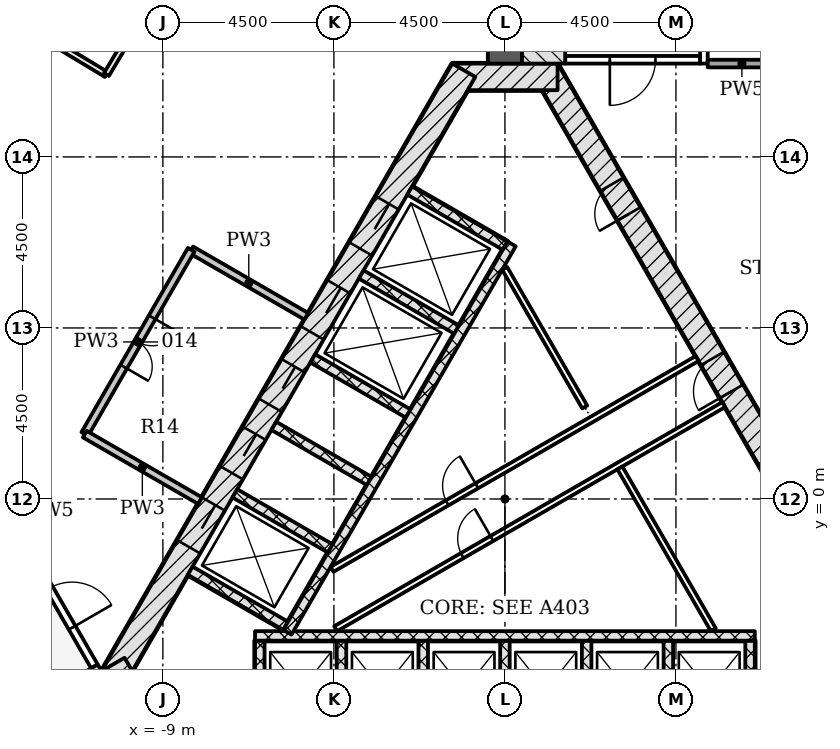
"""IFC4 building model, lengths in metres.
Left out: names, types, materials, properties, quantities, classifications, styles, units other than length and angle.
Written with IfcOpenShell. Run it as: python <this file> out.ifc"""

import sys

from ifc_helpers import new_model, si_unit, direction, frame, frame_2d, origin, place, context, subcontext, project, spatial, rectangle, extrude, element, fill, save


model = new_model("IFC4")
c1 = context("Model", 3, precision=1e-05, world=origin(), true_north=direction((0.0, 1.0)))
c2 = subcontext(c1, "Body", "Model", "MODEL_VIEW")
j1 = project(units=[si_unit("LENGTHUNIT", "METRE"), si_unit("PLANEANGLEUNIT", "RADIAN")], contexts=[c1])
p1 = place(None, origin())
s1 = spatial("IfcSite", under=j1, at=p1, CompositionType="ELEMENT")
p2 = place(p1, origin())
s2 = spatial("IfcBuilding", under=s1, at=p2, CompositionType="ELEMENT")
p3 = place(p2, origin())
s3 = spatial("IfcBuildingStorey", under=s2, at=p3, CompositionType="ELEMENT", Elevation=0.0)
p4 = place(p3, frame((10.311, -4.703, -0.25), z_axis=(0.0, 0.0, 1.0), x_axis=(-0.500001446645, 0.866024568562, 0.0)))
e1 = element("IfcWall", 1, at=p4, inside=s3, PredefinedType="SHEAR", context=c2, shape_type="SweptSolid", body=[
    extrude(rectangle(XDim=18.458, YDim=0.7, at=frame_2d((9.229, 0.0))), origin(), (0.0, 0.0, 1.0), 6.0),
])
p5 = place(p4, frame((8.7, 0.0, 0.25)))
e2 = element("IfcOpeningElement", 2, at=p5, cuts=e1, PredefinedType="OPENING", context=c2, shape_type="SweptSolid", body=[
    extrude(rectangle(XDim=1.0, YDim=2.1, at=frame_2d((0.5, 1.05))), frame((0.0, 0.36, 0.0), z_axis=(0.0, -1.0, 0.0), x_axis=(1.0, 0.0, 0.0)), (0.0, 0.0, 1.0), 0.72),
])
p6 = place(p4, frame((4.002, 0.0, 0.25)))
e3 = element("IfcOpeningElement", 3, at=p6, cuts=e1, PredefinedType="OPENING", context=c2, shape_type="SweptSolid", body=[
    extrude(rectangle(XDim=0.9, YDim=2.1, at=frame_2d((0.45, 1.05))), frame((0.0, 0.36, 0.0), z_axis=(0.0, -1.0, 0.0), x_axis=(1.0, 0.0, 0.0)), (0.0, 0.0, 1.0), 0.72),
])
p7 = place(p4, frame((14.093, 0.0, 0.25)))
e4 = element("IfcOpeningElement", 4, at=p7, cuts=e1, PredefinedType="OPENING", context=c2, shape_type="SweptSolid", body=[
    extrude(rectangle(XDim=0.9, YDim=2.1, at=frame_2d((0.45, 1.05))), frame((0.0, 0.36, 0.0), z_axis=(0.0, -1.0, 0.0), x_axis=(1.0, 0.0, 0.0)), (0.0, 0.0, 1.0), 0.72),
])
p8 = place(p3, frame((1.386, 11.106, -0.25), z_axis=(0.0, 0.0, 1.0), x_axis=(-1.0, 0.0, 0.0)))
e5 = element("IfcWall", 5, at=p8, inside=s3, PredefinedType="SHEAR", context=c2, shape_type="SweptSolid", body=[
    extrude(rectangle(XDim=2.771, YDim=0.7, at=frame_2d((1.386, 0.0))), origin(), (0.0, 0.0, 1.0), 6.0),
])
p9 = place(p3, frame((-1.083, 11.281, -0.25), z_axis=(0.0, 0.0, 1.0), x_axis=(-0.500001446645, -0.866024568562, 0.0)))
e6 = element("IfcWall", 6, at=p9, inside=s3, PredefinedType="SHEAR", context=c2, shape_type="SweptSolid", body=[
    extrude(rectangle(XDim=18.458, YDim=0.7, at=frame_2d((9.229, 0.0))), origin(), (0.0, 0.0, 1.0), 6.0),
])
p10 = place(p9, frame((4.029, 0.0, 0.25)))
e7 = element("IfcOpeningElement", 7, at=p10, cuts=e6, PredefinedType="OPENING", context=c2, shape_type="SweptSolid", body=[
    extrude(rectangle(XDim=1.4, YDim=2.1, at=frame_2d((0.7, 1.05))), frame((0.0, 0.36, 0.0), z_axis=(0.0, -1.0, 0.0), x_axis=(1.0, 0.0, 0.0)), (0.0, 0.0, 1.0), 0.72),
])
p11 = place(p9, frame((6.579, 0.0, 0.25)))
e8 = element("IfcOpeningElement", 8, at=p11, cuts=e6, PredefinedType="OPENING", context=c2, shape_type="SweptSolid", body=[
    extrude(rectangle(XDim=1.4, YDim=2.1, at=frame_2d((0.7, 1.05))), frame((0.0, 0.36, 0.0), z_axis=(0.0, -1.0, 0.0), x_axis=(1.0, 0.0, 0.0)), (0.0, 0.0, 1.0), 0.72),
])
p12 = place(p9, frame((8.979, 0.0, 0.25)))
e9 = element("IfcOpeningElement", 9, at=p12, cuts=e6, PredefinedType="OPENING", context=c2, shape_type="SweptSolid", body=[
    extrude(rectangle(XDim=1.2, YDim=2.1, at=frame_2d((0.6, 1.05))), frame((0.0, 0.36, 0.0), z_axis=(0.0, -1.0, 0.0), x_axis=(1.0, 0.0, 0.0)), (0.0, 0.0, 1.0), 0.72),
])
p13 = place(p9, frame((11.029, 0.0, 0.25)))
e10 = element("IfcOpeningElement", 10, at=p13, cuts=e6, PredefinedType="OPENING", context=c2, shape_type="SweptSolid", body=[
    extrude(rectangle(XDim=1.2, YDim=2.1, at=frame_2d((0.6, 1.05))), frame((0.0, 0.36, 0.0), z_axis=(0.0, -1.0, 0.0), x_axis=(1.0, 0.0, 0.0)), (0.0, 0.0, 1.0), 0.72),
])
p14 = place(p9, frame((13.179, 0.0, 0.25)))
e11 = element("IfcOpeningElement", 11, at=p14, cuts=e6, PredefinedType="OPENING", context=c2, shape_type="SweptSolid", body=[
    extrude(rectangle(XDim=1.3, YDim=2.1, at=frame_2d((0.65, 1.05))), frame((0.0, 0.36, 0.0), z_axis=(0.0, -1.0, 0.0), x_axis=(1.0, 0.0, 0.0)), (0.0, 0.0, 1.0), 0.72),
])
p15 = place(p3, frame((-10.311, -4.353, -0.25), z_axis=(0.0, 0.0, 1.0), x_axis=(0.500042739161, -0.866000726912, 0.0)))
e12 = element("IfcWall", 12, at=p15, inside=s3, PredefinedType="SHEAR", context=c2, shape_type="SweptSolid", body=[
    extrude(rectangle(XDim=2.771, YDim=0.7, at=frame_2d((1.386, 0.0))), origin(), (0.0, 0.0, 1.0), 6.0),
])
p16 = place(p3, frame((0.0, 11.456, -0.25), z_axis=(0.0, 0.0, 1.0), x_axis=(0.0, 1.0, 0.0)))
e13 = element("IfcWall", 13, at=p16, inside=s3, PredefinedType="SHEAR", context=c2, shape_type="SweptSolid", body=[
    extrude(rectangle(XDim=14.633, YDim=0.9, at=frame_2d((7.316, 0.0))), origin(), (0.0, 0.0, 1.0), 6.0),
])
for number, where, z_axis, x_axis in (
    (14, (-6.45, -6.228, -0.25), (0.0, 0.0, 1.0), (0.0, 1.0, 0.0)),
    (15, (-4.3, -6.228, -0.25), (0.0, 0.0, 1.0), (0.0, 1.0, 0.0)),
    (16, (-2.15, -6.228, -0.25), (0.0, 0.0, 1.0), (0.0, 1.0, 0.0)),
    (17, (0.0, -6.228, -0.25), (0.0, 0.0, 1.0), (0.0, 1.0, 0.0)),
    (18, (2.15, -6.228, -0.25), (0.0, 0.0, 1.0), (0.0, 1.0, 0.0)),
    (19, (4.3, -6.228, -0.25), (0.0, 0.0, 1.0), (0.0, 1.0, 0.0)),
    (20, (6.45, -6.228, -0.25), (0.0, 0.0, 1.0), (0.0, 1.0, 0.0)),
):
    element("IfcWall", number, at=place(p3, frame(where, z_axis=z_axis, x_axis=x_axis)), inside=s3, PredefinedType="PARTITIONING", context=c2, shape_type="SweptSolid", body=[
        extrude(rectangle(XDim=2.5, YDim=0.25, at=frame_2d((1.25, 0.0))), origin(), (0.0, 0.0, 1.0), 6.0),
    ])
p17 = place(p3, frame((-6.575, -3.603, 0.0), z_axis=(0.0, 0.0, 1.0), x_axis=(1.0, 0.0, 0.0)))
e21 = element("IfcWall", 21, at=p17, inside=s3, PredefinedType="PARTITIONING", context=c2, shape_type="SweptSolid", body=[
    extrude(rectangle(XDim=13.15, YDim=0.25, at=frame_2d((6.575, 0.0))), origin(), (0.0, 0.0, 1.0), 5.75),
])
p18 = place(p3, frame((-2.506, 8.115, -0.25), z_axis=(0.0, 0.0, 1.0), x_axis=(0.865996321171, -0.50005036918, 0.0)))
e22 = element("IfcWall", 22, at=p18, inside=s3, PredefinedType="PARTITIONING", context=c2, shape_type="SweptSolid", body=[
    extrude(rectangle(XDim=2.9, YDim=0.25, at=frame_2d((1.45, 0.0))), origin(), (0.0, 0.0, 1.0), 6.0),
])
for number, where, z_axis, x_axis in (
    (23, (-3.781, 5.907, -0.25), (0.0, 0.0, 1.0), (0.866, -0.5, 0.0)),
    (24, (-5.056, 3.699, -0.25), (0.0, 0.0, 1.0), (0.866, -0.5, 0.0)),
    (25, (-6.081, 1.923, -0.25), (0.0, 0.0, 1.0), (0.866, -0.5, 0.0)),
    (26, (-7.106, 0.148, -0.25), (0.0, 0.0, 1.0), (0.866, -0.5, 0.0)),
    (27, (-8.281, -1.887, -0.25), (0.0, 0.0, 1.0), (0.866, -0.5, 0.0)),
):
    element("IfcWall", number, at=place(p3, frame(where, z_axis=z_axis, x_axis=x_axis)), inside=s3, PredefinedType="PARTITIONING", context=c2, shape_type="SweptSolid", body=[
        extrude(rectangle(XDim=2.9, YDim=0.25, at=frame_2d((1.45, 0.0))), origin(), (0.0, 0.0, 1.0), 6.0),
    ])
p19 = place(p3, frame((0.176, 6.711, 0.0), z_axis=(0.0, 0.0, 1.0), x_axis=(-0.500004227369, -0.866022963098, 0.0)))
e28 = element("IfcWall", 28, at=p19, inside=s3, PredefinedType="PARTITIONING", context=c2, shape_type="SweptSolid", body=[
    extrude(rectangle(XDim=11.8, YDim=0.25, at=frame_2d((5.9, 0.0))), origin(), (0.0, 0.0, 1.0), 5.75),
])
p20 = place(p3, frame((-4.548, -1.851, 0.0), z_axis=(0.0, 0.0, 1.0), x_axis=(0.866023939251, 0.500002536638, 0.0)))
e29 = element("IfcWall", 29, at=p20, inside=s3, PredefinedType="PARTITIONING", context=c2, shape_type="SweptSolid", body=[
    extrude(rectangle(XDim=11.092, YDim=0.15, at=frame_2d((5.546, 0.0))), origin(), (0.0, 0.0, 1.0), 5.75),
])
p21 = place(p20, frame((3.497, 0.0, 0.0)))
e30 = element("IfcOpeningElement", 30, at=p21, cuts=e29, PredefinedType="OPENING", context=c2, shape_type="SweptSolid", body=[
    extrude(rectangle(XDim=0.9, YDim=2.1, at=frame_2d((0.45, 1.05))), frame((0.0, 0.085, 0.0), z_axis=(0.0, -1.0, 0.0), x_axis=(1.0, 0.0, 0.0)), (0.0, 0.0, 1.0), 0.17),
])
p22 = place(p3, frame((2.099, 2.42, 0.0), z_axis=(0.0, 0.0, 1.0), x_axis=(-0.499998449073, 0.866026299211, 0.0)))
e31 = element("IfcWall", 31, at=p22, inside=s3, PredefinedType="PARTITIONING", context=c2, shape_type="SweptSolid", body=[
    extrude(rectangle(XDim=4.211, YDim=0.15, at=frame_2d((2.106, 0.0))), origin(), (0.0, 0.0, 1.0), 5.75),
])
p23 = place(p3, frame((-4.454, -3.413, 0.0), z_axis=(0.0, 0.0, 1.0), x_axis=(0.86603043987, 0.499991277142, 0.0)))
e32 = element("IfcWall", 32, at=p23, inside=s3, PredefinedType="PARTITIONING", context=c2, shape_type="SweptSolid", body=[
    extrude(rectangle(XDim=11.792, YDim=0.15, at=frame_2d((5.896, 0.0))), origin(), (0.0, 0.0, 1.0), 5.75),
])
p24 = place(p23, frame((3.847, 0.0, 0.0)))
e33 = element("IfcOpeningElement", 33, at=p24, cuts=e32, PredefinedType="OPENING", context=c2, shape_type="SweptSolid", body=[
    extrude(rectangle(XDim=0.9, YDim=2.1, at=frame_2d((0.45, 1.05))), frame((0.0, 0.085, 0.0), z_axis=(0.0, -1.0, 0.0), x_axis=(1.0, 0.0, 0.0)), (0.0, 0.0, 1.0), 0.17),
])
p25 = place(p3, frame((5.482, -3.439, 0.0), z_axis=(0.0, 0.0, 1.0), x_axis=(-0.500006183238, 0.866021833861, 0.0)))
e34 = element("IfcWall", 34, at=p25, inside=s3, PredefinedType="PARTITIONING", context=c2, shape_type="SweptSolid", body=[
    extrude(rectangle(XDim=4.916, YDim=0.15, at=frame_2d((2.458, 0.0))), origin(), (0.0, 0.0, 1.0), 5.75),
])
p26 = place(p3, frame((5.135, 11.556, -0.25), z_axis=(0.0, 0.0, 1.0), x_axis=(-1.0, 0.0, 0.0)))
e35 = element("IfcWall", 35, at=p26, inside=s3, PredefinedType="SHEAR", context=c2, shape_type="SweptSolid", body=[
    extrude(rectangle(XDim=3.55, YDim=0.2, at=frame_2d((1.775, 0.0))), origin(), (0.0, 0.0, 1.0), 6.0),
])
p27 = place(p26, frame((1.175, 0.0, 0.25)))
e36 = element("IfcOpeningElement", 36, at=p27, cuts=e35, PredefinedType="OPENING", context=c2, shape_type="SweptSolid", body=[
    extrude(rectangle(XDim=1.2, YDim=2.1, at=frame_2d((0.6, 1.05))), frame((0.0, 0.11, 0.0), z_axis=(0.0, -1.0, 0.0), x_axis=(1.0, 0.0, 0.0)), (0.0, 0.0, 1.0), 0.22),
])
p28 = place(p3, frame((5.236, 11.456, -0.25), z_axis=(0.0, 0.0, 1.0), x_axis=(0.0, 1.0, 0.0)))
e37 = element("IfcWall", 37, at=p28, inside=s3, PredefinedType="SHEAR", context=c2, shape_type="SweptSolid", body=[
    extrude(rectangle(XDim=5.6, YDim=0.2, at=frame_2d((2.8, 0.0))), origin(), (0.0, 0.0, 1.0), 6.0),
])
p29 = place(p28, frame((0.45, 0.0, 0.25)))
e38 = element("IfcOpeningElement", 38, at=p29, cuts=e37, PredefinedType="OPENING", context=c2, shape_type="SweptSolid", body=[
    extrude(rectangle(XDim=1.2, YDim=2.1, at=frame_2d((0.6, 1.05))), frame((0.0, 0.11, 0.0), z_axis=(0.0, -1.0, 0.0), x_axis=(1.0, 0.0, 0.0)), (0.0, 0.0, 1.0), 0.22),
])
p30 = place(p3, frame((1.018, 11.456, -0.25), z_axis=(0.0, 0.0, 1.0), x_axis=(0.0, 1.0, 0.0)))
e39 = element("IfcWall", 39, at=p30, inside=s3, PredefinedType="SHEAR", context=c2, shape_type="SweptSolid", body=[
    extrude(rectangle(XDim=7.2, YDim=1.136, at=frame_2d((3.6, 0.0))), origin(), (0.0, 0.0, 1.0), 6.0),
])
p31 = place(p3, frame((-12.576, -1.331, -0.25), z_axis=(0.0, 0.0, 1.0), x_axis=(0.499970499736, -0.8660424351, 0.0)))
e40 = element("IfcWall", 40, at=p31, inside=s3, PredefinedType="SHEAR", context=c2, shape_type="SweptSolid", body=[
    extrude(rectangle(XDim=3.55, YDim=0.2, at=frame_2d((1.775, 0.0))), origin(), (0.0, 0.0, 1.0), 6.0),
])
p32 = place(p31, frame((1.175, 0.0, 0.25)))
e41 = element("IfcOpeningElement", 41, at=p32, cuts=e40, PredefinedType="OPENING", context=c2, shape_type="SweptSolid", body=[
    extrude(rectangle(XDim=1.2, YDim=2.1, at=frame_2d((0.6, 1.05))), frame((0.0, 0.11, 0.0), z_axis=(0.0, -1.0, 0.0), x_axis=(1.0, 0.0, 0.0)), (0.0, 0.0, 1.0), 0.22),
])
p33 = place(p3, frame((-10.43, -4.847, -0.25), z_axis=(0.0, 0.0, 1.0), x_axis=(-0.866018442252, -0.500012057535, 0.0)))
e42 = element("IfcWall", 42, at=p33, inside=s3, PredefinedType="SHEAR", context=c2, shape_type="SweptSolid", body=[
    extrude(rectangle(XDim=7.2, YDim=1.136, at=frame_2d((3.6, 0.0))), origin(), (0.0, 0.0, 1.0), 6.0),
])
p34 = place(p3, frame((7.136, 11.456, 0.0), z_axis=(0.0, 0.0, 1.0), x_axis=(-1.0, 0.0, 0.0)))
e43 = element("IfcWall", 43, at=p34, inside=s3, PredefinedType="PARTITIONING", context=c2, shape_type="SweptSolid", body=[
    extrude(rectangle(XDim=1.8, YDim=0.2, at=frame_2d((0.9, 0.0))), origin(), (0.0, 0.0, 1.0), 5.75),
])
p35 = place(p3, frame((-5.225, 4.806, 0.0), z_axis=(0.0, 0.0, 1.0), x_axis=(-0.865932233204, 0.500161341467, 0.0)))
e44 = element("IfcWall", 44, at=p35, inside=s3, PredefinedType="PARTITIONING", context=c2, shape_type="SweptSolid", body=[
    extrude(rectangle(XDim=3.499, YDim=0.2, at=frame_2d((1.75, 0.0))), origin(), (0.0, 0.0, 1.0), 5.75),
])
p36 = place(p3, frame((-8.256, 6.556, 0.0), z_axis=(0.0, 0.0, 1.0), x_axis=(-0.500040756506, -0.866001871726, 0.0)))
e45 = element("IfcWall", 45, at=p36, inside=s3, PredefinedType="PARTITIONING", context=c2, shape_type="SweptSolid", body=[
    extrude(rectangle(XDim=5.599, YDim=0.2, at=frame_2d((2.8, 0.0))), origin(), (0.0, 0.0, 1.0), 5.138),
])
p37 = place(p36, frame((2.05, 0.0, 0.0)))
e46 = element("IfcOpeningElement", 46, at=p37, cuts=e45, PredefinedType="OPENING", context=c2, shape_type="SweptSolid", body=[
    extrude(rectangle(XDim=1.5, YDim=2.1, at=frame_2d((0.75, 1.05))), frame((0.0, 0.11, 0.0), z_axis=(0.0, -1.0, 0.0), x_axis=(1.0, 0.0, 0.0)), (0.0, 0.0, 1.0), 0.22),
])
p38 = place(p3, frame((-11.056, 1.707, 0.0), z_axis=(0.0, 0.0, 1.0), x_axis=(0.866019471182, -0.500010275428, 0.0)))
e47 = element("IfcWall", 47, at=p38, inside=s3, PredefinedType="PARTITIONING", context=c2, shape_type="SweptSolid", body=[
    extrude(rectangle(XDim=3.5, YDim=0.2, at=frame_2d((1.75, 0.0))), origin(), (0.0, 0.0, 1.0), 5.75),
])
p39 = place(p3, frame((-12.735, 12.524, 0.0), z_axis=(0.0, 0.0, 1.0), x_axis=(0.856490884452, -0.516162149766, 0.0)))
e48 = element("IfcWall", 48, at=p39, inside=s3, PredefinedType="PARTITIONING", context=c2, shape_type="SweptSolid", body=[
    extrude(rectangle(XDim=2.627, YDim=0.15, at=frame_2d((1.313, 0.0))), origin(), (0.0, 0.0, 1.0), 5.138),
])
p40 = place(p3, frame((-10.485, 11.169, 0.0), z_axis=(0.0, 0.0, 1.0), x_axis=(0.513360176277, 0.858173251397, 0.0)))
e49 = element("IfcWall", 49, at=p40, inside=s3, PredefinedType="PARTITIONING", context=c2, shape_type="SweptSolid", body=[
    extrude(rectangle(XDim=4.428, YDim=0.15, at=frame_2d((2.214, 0.0))), origin(), (0.0, 0.0, 1.0), 5.138),
])
p41 = place(p40, frame((1.75, 0.0, 0.0)))
e50 = element("IfcOpeningElement", 50, at=p41, cuts=e49, PredefinedType="OPENING", context=c2, shape_type="SweptSolid", body=[
    extrude(rectangle(XDim=1.0, YDim=2.1, at=frame_2d((0.5, 1.05))), frame((0.0, 0.085, 0.0), z_axis=(0.0, -1.0, 0.0), x_axis=(1.0, 0.0, 0.0)), (0.0, 0.0, 1.0), 0.17),
])
p42 = place(p10, origin())
e51 = element("IfcDoor", 51, at=p42, inside=s3, OperationType="DOUBLE_DOOR_SLIDING", PredefinedType="DOOR", context=c2, shape_type="SweptSolid", body=[
    extrude(rectangle(XDim=1.4, YDim=2.1, at=frame_2d((0.7, 1.05))), frame((0.0, 0.025, 0.0), z_axis=(0.0, -1.0, 0.0), x_axis=(1.0, 0.0, 0.0)), (0.0, 0.0, 1.0), 0.05),
])
fill(e7, e51)
p43 = place(p11, origin())
e52 = element("IfcDoor", 52, at=p43, inside=s3, OperationType="DOUBLE_DOOR_SLIDING", PredefinedType="DOOR", context=c2, shape_type="SweptSolid", body=[
    extrude(rectangle(XDim=1.4, YDim=2.1, at=frame_2d((0.7, 1.05))), frame((0.0, 0.025, 0.0), z_axis=(0.0, -1.0, 0.0), x_axis=(1.0, 0.0, 0.0)), (0.0, 0.0, 1.0), 0.05),
])
fill(e8, e52)
p44 = place(p12, origin())
e53 = element("IfcDoor", 53, at=p44, inside=s3, OperationType="DOUBLE_DOOR_SLIDING", PredefinedType="DOOR", context=c2, shape_type="SweptSolid", body=[
    extrude(rectangle(XDim=1.2, YDim=2.1, at=frame_2d((0.6, 1.05))), frame((0.0, 0.025, 0.0), z_axis=(0.0, -1.0, 0.0), x_axis=(1.0, 0.0, 0.0)), (0.0, 0.0, 1.0), 0.05),
])
fill(e9, e53)
p45 = place(p13, origin())
e54 = element("IfcDoor", 54, at=p45, inside=s3, OperationType="DOUBLE_DOOR_SLIDING", PredefinedType="DOOR", context=c2, shape_type="SweptSolid", body=[
    extrude(rectangle(XDim=1.2, YDim=2.1, at=frame_2d((0.6, 1.05))), frame((0.0, 0.025, 0.0), z_axis=(0.0, -1.0, 0.0), x_axis=(1.0, 0.0, 0.0)), (0.0, 0.0, 1.0), 0.05),
])
fill(e10, e54)
p46 = place(p14, origin())
e55 = element("IfcDoor", 55, at=p46, inside=s3, OperationType="DOUBLE_DOOR_SLIDING", PredefinedType="DOOR", context=c2, shape_type="SweptSolid", body=[
    extrude(rectangle(XDim=1.3, YDim=2.1, at=frame_2d((0.65, 1.05))), frame((0.0, 0.025, 0.0), z_axis=(0.0, -1.0, 0.0), x_axis=(1.0, 0.0, 0.0)), (0.0, 0.0, 1.0), 0.05),
])
fill(e11, e55)
p47 = place(p5, origin())
e56 = element("IfcDoor", 56, at=p47, inside=s3, OperationType="SINGLE_SWING_LEFT", PredefinedType="DOOR", context=c2, shape_type="SweptSolid", body=[
    extrude(rectangle(XDim=1.0, YDim=2.1, at=frame_2d((0.5, 1.05))), frame((0.0, 0.075, 0.0), z_axis=(0.0, -1.0, 0.0), x_axis=(1.0, 0.0, 0.0)), (0.0, 0.0, 1.0), 0.15),
])
fill(e2, e56)
p48 = place(p7, origin())
e57 = element("IfcDoor", 57, at=p48, inside=s3, OperationType="SINGLE_SWING_LEFT", PredefinedType="DOOR", context=c2, shape_type="SweptSolid", body=[
    extrude(rectangle(XDim=0.9, YDim=2.1, at=frame_2d((0.45, 1.05))), frame((0.0, 0.075, 0.0), z_axis=(0.0, -1.0, 0.0), x_axis=(1.0, 0.0, 0.0)), (0.0, 0.0, 1.0), 0.15),
])
fill(e4, e57)
p49 = place(p24, origin())
e58 = element("IfcDoor", 58, at=p49, inside=s3, OperationType="SINGLE_SWING_RIGHT", PredefinedType="DOOR", context=c2, shape_type="SweptSolid", body=[
    extrude(rectangle(XDim=0.9, YDim=2.1, at=frame_2d((0.45, 1.05))), frame((0.0, 0.025, 0.0), z_axis=(0.0, -1.0, 0.0), x_axis=(1.0, 0.0, 0.0)), (0.0, 0.0, 1.0), 0.05),
])
fill(e33, e58)
p50 = place(p21, origin())
e59 = element("IfcDoor", 59, at=p50, inside=s3, OperationType="SINGLE_SWING_RIGHT", PredefinedType="DOOR", context=c2, shape_type="SweptSolid", body=[
    extrude(rectangle(XDim=0.9, YDim=2.1, at=frame_2d((0.45, 1.05))), frame((0.0, 0.025, 0.0), z_axis=(0.0, -1.0, 0.0), x_axis=(1.0, 0.0, 0.0)), (0.0, 0.0, 1.0), 0.05),
])
fill(e30, e59)
p51 = place(p27, origin())
e60 = element("IfcDoor", 60, at=p51, inside=s3, OperationType="SINGLE_SWING_RIGHT", PredefinedType="DOOR", context=c2, shape_type="SweptSolid", body=[
    extrude(rectangle(XDim=1.2, YDim=2.1, at=frame_2d((0.6, 1.05))), frame((0.0, 0.025, 0.0), z_axis=(0.0, -1.0, 0.0), x_axis=(1.0, 0.0, 0.0)), (0.0, 0.0, 1.0), 0.05),
])
fill(e36, e60)
p52 = place(p32, origin())
e61 = element("IfcDoor", 61, at=p52, inside=s3, OperationType="SINGLE_SWING_RIGHT", PredefinedType="DOOR", context=c2, shape_type="SweptSolid", body=[
    extrude(rectangle(XDim=1.2, YDim=2.1, at=frame_2d((0.6, 1.05))), frame((0.0, 0.025, 0.0), z_axis=(0.0, -1.0, 0.0), x_axis=(1.0, 0.0, 0.0)), (0.0, 0.0, 1.0), 0.05),
])
fill(e41, e61)
p53 = place(p37, origin())
e62 = element("IfcDoor", 62, at=p53, inside=s3, OperationType="DOUBLE_DOOR_SINGLE_SWING", PredefinedType="DOOR", context=c2, shape_type="SweptSolid", body=[
    extrude(rectangle(XDim=1.5, YDim=2.1, at=frame_2d((0.75, 1.05))), frame((0.0, 0.025, 0.0), z_axis=(0.0, -1.0, 0.0), x_axis=(1.0, 0.0, 0.0)), (0.0, 0.0, 1.0), 0.05),
])
fill(e46, e62)
save(model, sys.argv[1])
